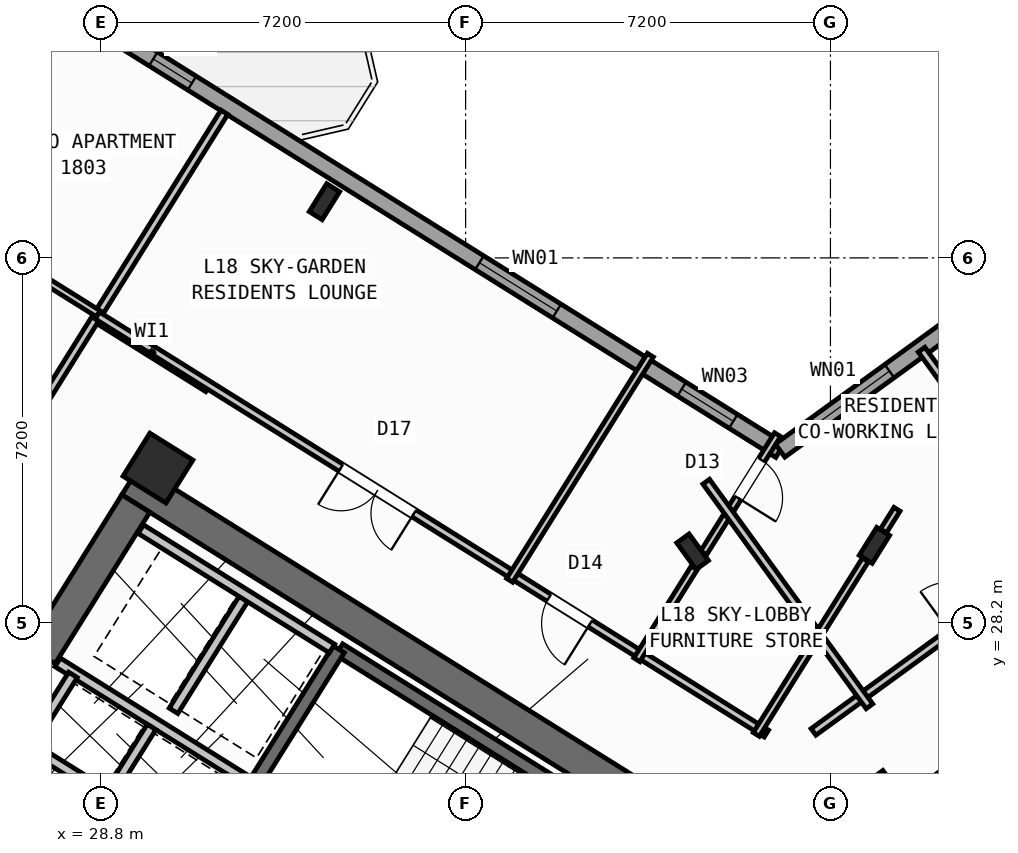
"""IFC4 building model, lengths in metres.
Left out: names, types, materials, properties, quantities, classifications, styles, units other than length and angle.
Written with IfcOpenShell. Run it as: python <this file> out.ifc"""

import sys

from ifc_helpers import new_model, si_unit, direction, frame, frame_2d, origin, origin_2d, place, context, subcontext, project, spatial, rectangle, hollow_rectangle, i_section, extrude, source, transform, mapped, element, fill, save


model = new_model("IFC4")
c1 = context("Model", 3, precision=1e-05, world=origin(), true_north=direction((0.0, 1.0)))
c2 = subcontext(c1, "Body", "Model", "MODEL_VIEW")
j1 = project(units=[si_unit("LENGTHUNIT", "METRE"), si_unit("PLANEANGLEUNIT", "RADIAN")], contexts=[c1])
p1 = place(None, origin())
s1 = spatial("IfcSite", under=j1, at=p1, CompositionType="ELEMENT")
p2 = place(p1, origin())
s2 = spatial("IfcBuilding", under=s1, at=p2, CompositionType="ELEMENT")
p3 = place(p2, frame((0.0, 0.0, 71.7)))
s3 = spatial("IfcBuildingStorey", under=s2, at=p3, CompositionType="ELEMENT", Elevation=71.7)
p4 = place(p3, frame((40.615, 23.983, 0.0), z_axis=(0.0, 0.0, 1.0), x_axis=(-0.848045953968, 0.529922692436, 0.0)))
e1 = element("IfcWall", 1, at=p4, inside=s3, PredefinedType="SHEAR", context=c2, shape_type="SweptSolid", body=[
    extrude(rectangle(XDim=13.24, YDim=0.65, at=frame_2d((6.62, 0.0))), origin(), (0.0, 0.0, 1.0), 4.52),
])
p5 = place(p3, frame((29.491, 30.552, 0.0), z_axis=(0.0, 0.0, 1.0), x_axis=(-0.529893103397, -0.8480644427, 0.0)))
e2 = element("IfcWall", 2, at=p5, inside=s3, PredefinedType="SHEAR", context=c2, shape_type="SweptSolid", body=[
    extrude(rectangle(XDim=3.525, YDim=0.65, at=frame_2d((1.763, 0.0))), origin(), (0.0, 0.0, 1.0), 4.52),
])
p6 = place(p3, frame((44.325, 24.113, 0.0), z_axis=(0.0, 0.0, 1.0), x_axis=(0.809012664862, 0.58779121131, 0.0)))
e3 = element("IfcWall", 3, at=p6, inside=s3, PredefinedType="SHEAR", context=c2, shape_type="SweptSolid", body=[
    extrude(rectangle(XDim=12.44, YDim=0.65, at=frame_2d((6.22, 0.0))), origin(), (0.0, 0.0, 1.0), 4.52),
])
m1 = source(origin(), c2, "Body", "SweptSolid", [
    extrude(i_section(OverallWidth=0.3, OverallDepth=0.65, WebThickness=0.016, FlangeThickness=0.031, at=origin_2d()), origin(), (0.0, 0.0, 1.0), 4.8),
])
for number, where, z_axis, x_axis in (
    (4, (44.068, 29.726, 0.0), (0.0, 0.0, 1.0), (-0.848, 0.53, 0.0)),
    (5, (33.213, 36.509, 0.0), (0.0, 0.0, 1.0), (-0.848, 0.53, 0.0)),
):
    element("IfcColumn", number, at=place(p3, frame(where, z_axis=z_axis, x_axis=x_axis)), inside=s3, PredefinedType="COLUMN", context=c2, shape_type="MappedRepresentation", body=[
        mapped(m1, transform((0.0, 0.0, 0.0), scale=1.0)),
    ])
m2 = source(origin(), c2, "Body", "SweptSolid", [
    extrude(hollow_rectangle(XDim=1.0, YDim=1.0, WallThickness=0.04, at=origin_2d()), origin(), (0.0, 0.0, 1.0), 4.8),
])
for number, where, z_axis, x_axis in (
    (6, (29.928, 31.251, 0.0), (0.0, 0.0, 1.0), (-0.848, 0.53, 0.0)),
    (7, (44.124, 24.585, 0.0), (0.0, 0.0, 1.0), (0.809, 0.588, 0.0)),
):
    element("IfcColumn", number, at=place(p3, frame(where, z_axis=z_axis, x_axis=x_axis)), inside=s3, PredefinedType="COLUMN", context=c2, shape_type="MappedRepresentation", body=[
        mapped(m2, transform((0.0, 0.0, 0.0), scale=1.0)),
    ])
p7 = place(p3, frame((40.479, 29.601, 0.0), z_axis=(0.0, 0.0, 1.0), x_axis=(0.809016994375, 0.587785252292, 0.0)))
e8 = element("IfcColumn", 8, at=p7, inside=s3, PredefinedType="COLUMN", context=c2, shape_type="MappedRepresentation", body=[
    mapped(m1, transform((0.0, 0.0, 0.0), scale=1.0)),
])
p8 = place(p3, frame((31.76, 12.183, 0.0), z_axis=(0.0, 0.0, 1.0), x_axis=(-0.848047074256, 0.529920899612, 0.0)))
e9 = element("IfcWall", 9, at=p8, inside=s3, PredefinedType="STANDARD", context=c2, shape_type="SweptSolid", body=[
    extrude(rectangle(XDim=30.652, YDim=0.32, at=frame_2d((15.326, 0.0))), origin(), (0.0, 0.0, 1.0), 4.52),
])
p9 = place(p8, frame((20.241, 0.0, 0.0)))
e10 = element("IfcOpeningElement", 10, at=p9, cuts=e9, PredefinedType="OPENING", context=c2, shape_type="SweptSolid", body=[
    extrude(rectangle(XDim=1.2, YDim=2.15, at=frame_2d((0.6, 1.075))), frame((0.0, 0.17, 0.0), z_axis=(0.0, -1.0, 0.0), x_axis=(1.0, 0.0, 0.0)), (0.0, 0.0, 1.0), 0.34),
])
p10 = place(p8, frame((14.781, 0.0, 0.0)))
e11 = element("IfcOpeningElement", 11, at=p10, cuts=e9, PredefinedType="OPENING", context=c2, shape_type="SweptSolid", body=[
    extrude(rectangle(XDim=1.5, YDim=2.25, at=frame_2d((0.75, 1.125))), frame((0.0, 0.17, 0.0), z_axis=(0.0, -1.0, 0.0), x_axis=(1.0, 0.0, 0.0)), (0.0, 0.0, 1.0), 0.34),
])
p11 = place(p8, frame((1.84, 0.0, 0.75)))
e12 = element("IfcOpeningElement", 12, at=p11, cuts=e9, PredefinedType="OPENING", context=c2, shape_type="SweptSolid", body=[
    extrude(rectangle(XDim=2.4, YDim=1.6, at=frame_2d((1.2, 0.8))), frame((0.0, 0.17, 0.0), z_axis=(0.0, -1.0, 0.0), x_axis=(1.0, 0.0, 0.0)), (0.0, 0.0, 1.0), 0.34),
])
p12 = place(p8, frame((7.019, 0.0, 0.75)))
e13 = element("IfcOpeningElement", 13, at=p12, cuts=e9, PredefinedType="OPENING", context=c2, shape_type="SweptSolid", body=[
    extrude(rectangle(XDim=2.4, YDim=1.6, at=frame_2d((1.2, 0.8))), frame((0.0, 0.17, 0.0), z_axis=(0.0, -1.0, 0.0), x_axis=(1.0, 0.0, 0.0)), (0.0, 0.0, 1.0), 0.34),
])
p13 = place(p8, frame((25.841, 0.0, 0.95)))
e14 = element("IfcOpeningElement", 14, at=p13, cuts=e9, PredefinedType="OPENING", context=c2, shape_type="SweptSolid", body=[
    extrude(rectangle(XDim=1.2, YDim=1.4, at=frame_2d((0.6, 0.7))), frame((0.0, 0.17, 0.0), z_axis=(0.0, -1.0, 0.0), x_axis=(1.0, 0.0, 0.0)), (0.0, 0.0, 1.0), 0.34),
])
p14 = place(p3, frame((17.424, 47.083, 0.0), z_axis=(0.0, 0.0, 1.0), x_axis=(0.848049927979, -0.529916332693, 0.0)))
e15 = element("IfcWall", 15, at=p14, inside=s3, PredefinedType="STANDARD", context=c2, shape_type="SweptSolid", body=[
    extrude(rectangle(XDim=29.223, YDim=0.32, at=frame_2d((14.612, 0.0))), origin(), (0.0, 0.0, 1.0), 4.52),
])
p15 = place(p14, frame((3.339, 0.0, 0.0)))
e16 = element("IfcOpeningElement", 16, at=p15, cuts=e15, PredefinedType="OPENING", context=c2, shape_type="SweptSolid", body=[
    extrude(rectangle(XDim=1.05, YDim=2.15, at=frame_2d((0.525, 1.075))), frame((0.0, 0.17, 0.0), z_axis=(0.0, -1.0, 0.0), x_axis=(1.0, 0.0, 0.0)), (0.0, 0.0, 1.0), 0.34),
])
p16 = place(p14, frame((8.194, 0.0, 0.75)))
e17 = element("IfcOpeningElement", 17, at=p16, cuts=e15, PredefinedType="OPENING", context=c2, shape_type="SweptSolid", body=[
    extrude(rectangle(XDim=2.4, YDim=1.6, at=frame_2d((1.2, 0.8))), frame((0.0, 0.17, 0.0), z_axis=(0.0, -1.0, 0.0), x_axis=(1.0, 0.0, 0.0)), (0.0, 0.0, 1.0), 0.34),
])
p17 = place(p14, frame((22.226, 0.0, 0.85)))
e18 = element("IfcOpeningElement", 18, at=p17, cuts=e15, PredefinedType="OPENING", context=c2, shape_type="SweptSolid", body=[
    extrude(rectangle(XDim=1.8, YDim=1.5, at=frame_2d((0.9, 0.75))), frame((0.0, 0.17, 0.0), z_axis=(0.0, -1.0, 0.0), x_axis=(1.0, 0.0, 0.0)), (0.0, 0.0, 1.0), 0.34),
])
p18 = place(p14, frame((26.934, 0.0, 0.95)))
e19 = element("IfcOpeningElement", 19, at=p18, cuts=e15, PredefinedType="OPENING", context=c2, shape_type="SweptSolid", body=[
    extrude(rectangle(XDim=1.2, YDim=1.4, at=frame_2d((0.6, 0.7))), frame((0.0, 0.17, 0.0), z_axis=(0.0, -1.0, 0.0), x_axis=(1.0, 0.0, 0.0)), (0.0, 0.0, 1.0), 0.34),
])
p19 = place(p14, frame((14.636, 0.0, 1.0)))
e20 = element("IfcOpeningElement", 20, at=p19, cuts=e15, PredefinedType="OPENING", context=c2, shape_type="SweptSolid", body=[
    extrude(rectangle(XDim=0.9, YDim=1.25, at=frame_2d((0.45, 0.625))), frame((0.0, 0.17, 0.0), z_axis=(0.0, -1.0, 0.0), x_axis=(1.0, 0.0, 0.0)), (0.0, 0.0, 1.0), 0.34),
])
p20 = place(p3, frame((42.207, 31.597, 0.0), z_axis=(0.0, 0.0, 1.0), x_axis=(0.809020333377, 0.587780656523, 0.0)))
e21 = element("IfcWall", 21, at=p20, inside=s3, PredefinedType="STANDARD", context=c2, shape_type="SweptSolid", body=[
    extrude(rectangle(XDim=15.223, YDim=0.32, at=frame_2d((7.611, 0.0))), origin(), (0.0, 0.0, 1.0), 4.52),
])
p21 = place(p20, frame((12.562, 0.0, 0.0)))
e22 = element("IfcOpeningElement", 22, at=p21, cuts=e21, PredefinedType="OPENING", context=c2, shape_type="SweptSolid", body=[
    extrude(rectangle(XDim=1.05, YDim=2.15, at=frame_2d((0.525, 1.075))), frame((0.0, 0.17, 0.0), z_axis=(0.0, -1.0, 0.0), x_axis=(1.0, 0.0, 0.0)), (0.0, 0.0, 1.0), 0.34),
])
p22 = place(p20, frame((0.868, 0.0, 0.85)))
e23 = element("IfcOpeningElement", 23, at=p22, cuts=e21, PredefinedType="OPENING", context=c2, shape_type="SweptSolid", body=[
    extrude(rectangle(XDim=1.8, YDim=1.5, at=frame_2d((0.9, 0.75))), frame((0.0, 0.17, 0.0), z_axis=(0.0, -1.0, 0.0), x_axis=(1.0, 0.0, 0.0)), (0.0, 0.0, 1.0), 0.34),
])
p23 = place(p20, frame((4.932, 0.0, 0.85)))
e24 = element("IfcOpeningElement", 24, at=p23, cuts=e21, PredefinedType="OPENING", context=c2, shape_type="SweptSolid", body=[
    extrude(rectangle(XDim=1.8, YDim=1.5, at=frame_2d((0.9, 0.75))), frame((0.0, 0.17, 0.0), z_axis=(0.0, -1.0, 0.0), x_axis=(1.0, 0.0, 0.0)), (0.0, 0.0, 1.0), 0.34),
])
p24 = place(p3, frame((39.721, 23.788, 0.0), z_axis=(0.0, 0.0, 1.0), x_axis=(-0.848054434086, 0.529909121291, 0.0)))
e25 = element("IfcWall", 25, at=p24, inside=s3, PredefinedType="SHEAR", context=c2, shape_type="SweptSolid", body=[
    extrude(rectangle(XDim=7.33, YDim=0.26, at=frame_2d((3.665, 0.0))), origin(), (0.0, 0.0, 1.0), 4.52),
])
p25 = place(p3, frame((33.496, 27.677, 0.0), z_axis=(0.0, 0.0, 1.0), x_axis=(-0.529908658664, -0.84805472316, 0.0)))
e26 = element("IfcWall", 26, at=p25, inside=s3, PredefinedType="SHEAR", context=c2, shape_type="SweptSolid", body=[
    extrude(rectangle(XDim=3.16, YDim=0.26, at=frame_2d((1.58, 0.0))), origin(), (0.0, 0.0, 1.0), 4.52),
])
p26 = place(p3, frame((31.822, 24.998, 0.0), z_axis=(0.0, 0.0, 1.0), x_axis=(-0.848058348634, 0.529902856485, 0.0)))
e27 = element("IfcWall", 27, at=p26, inside=s3, PredefinedType="STANDARD", context=c2, shape_type="SweptSolid", body=[
    extrude(rectangle(XDim=4.568, YDim=0.2, at=frame_2d((2.284, 0.0))), origin(), (0.0, 0.0, 1.0), 4.51),
])
p27 = place(p3, frame((32.108, 22.814, 0.0), z_axis=(0.0, 0.0, 1.0), x_axis=(-0.848042229521, 0.529928652696, 0.0)))
e28 = element("IfcWall", 28, at=p27, inside=s3, PredefinedType="STANDARD", context=c2, shape_type="SweptSolid", body=[
    extrude(rectangle(XDim=5.62, YDim=0.2, at=frame_2d((2.81, 0.0))), origin(), (0.0, 0.0, 1.0), 4.51),
])
p28 = place(p3, frame((28.25, 27.17, 0.0), z_axis=(0.0, 0.0, 1.0), x_axis=(-0.529905827651, -0.848056492117, 0.0)))
e29 = element("IfcWall", 29, at=p28, inside=s3, PredefinedType="STANDARD", context=c2, shape_type="SweptSolid", body=[
    extrude(rectangle(XDim=1.65, YDim=0.2, at=frame_2d((0.825, 0.0))), origin(), (0.0, 0.0, 1.0), 4.51),
])
p29 = place(p3, frame((31.645, 28.716, 0.0), z_axis=(0.0, 0.0, 1.0), x_axis=(-0.52986693015, -0.848080795876, 0.0)))
e30 = element("IfcWall", 30, at=p29, inside=s3, PredefinedType="STANDARD", context=c2, shape_type="SweptSolid", body=[
    extrude(rectangle(XDim=2.66, YDim=0.2, at=frame_2d((1.33, 0.0))), origin(), (0.0, 0.0, 1.0), 4.51),
])
p30 = place(p3, frame((33.363, 27.69, 0.0), z_axis=(0.0, 0.0, 1.0), x_axis=(-0.848053806312, 0.529910125964, 0.0)))
e31 = element("IfcWall", 31, at=p30, inside=s3, PredefinedType="STANDARD", context=c2, shape_type="SweptSolid", body=[
    extrude(rectangle(XDim=4.448, YDim=0.2, at=frame_2d((2.224, 0.0))), origin(), (0.0, 0.0, 1.0), 4.51),
])
p31 = place(p3, frame((29.801, 26.142, 0.0), z_axis=(0.0, 0.0, 1.0), x_axis=(-0.529998940003, -0.847998304005, 0.0)))
e32 = element("IfcWall", 32, at=p31, inside=s3, PredefinedType="STANDARD", context=c2, shape_type="SweptSolid", body=[
    extrude(rectangle(XDim=1.58, YDim=0.2, at=frame_2d((0.79, 0.0))), origin(), (0.0, 0.0, 1.0), 4.51),
])
p32 = place(p3, frame((30.914, 32.829, 0.0), z_axis=(0.0, 0.0, 1.0), x_axis=(-0.848008813643, 0.529982124211, 0.0)))
e33 = element("IfcWall", 33, at=p32, inside=s3, PredefinedType="PARTITIONING", context=c2, shape_type="SweptSolid", body=[
    extrude(rectangle(XDim=2.61, YDim=0.16, at=frame_2d((1.305, 0.0))), origin(), (0.0, 0.0, 1.0), 4.51),
])
p33 = place(p3, frame((31.239, 38.274, 0.0), z_axis=(0.0, 0.0, 1.0), x_axis=(-0.529920220799, -0.848047498427, 0.0)))
e34 = element("IfcWall", 34, at=p33, inside=s3, PredefinedType="PARTITIONING", context=c2, shape_type="SweptSolid", body=[
    extrude(rectangle(XDim=9.2, YDim=0.16, at=frame_2d((4.6, 0.0))), origin(), (0.0, 0.0, 1.0), 4.51),
])
p34 = place(p3, frame((28.753, 34.297, 0.0), z_axis=(0.0, 0.0, 1.0), x_axis=(-0.848059820872, 0.529900500304, 0.0)))
e35 = element("IfcWall", 35, at=p34, inside=s3, PredefinedType="PLUMBINGWALL", context=c2, shape_type="SweptSolid", body=[
    extrude(rectangle(XDim=3.79, YDim=0.14, at=frame_2d((1.895, 0.0))), origin(), (0.0, 0.0, 1.0), 4.51),
])
p35 = place(p34, frame((1.87, 0.0, 0.0)))
e36 = element("IfcOpeningElement", 36, at=p35, cuts=e35, PredefinedType="OPENING", context=c2, shape_type="SweptSolid", body=[
    extrude(rectangle(XDim=0.78, YDim=2.05, at=frame_2d((0.39, 1.025))), frame((0.0, 0.08, 0.0), z_axis=(0.0, -1.0, 0.0), x_axis=(1.0, 0.0, 0.0)), (0.0, 0.0, 1.0), 0.16),
])
p36 = place(p3, frame((41.936, 26.012, 0.0), z_axis=(0.0, 0.0, 1.0), x_axis=(-0.848051154596, 0.529914369676, 0.0)))
e37 = element("IfcWall", 37, at=p36, inside=s3, PredefinedType="PARTITIONING", context=c2, shape_type="SweptSolid", body=[
    extrude(rectangle(XDim=15.57, YDim=0.16, at=frame_2d((7.785, 0.0))), origin(), (0.0, 0.0, 1.0), 4.51),
])
p37 = place(p36, frame((4.1, 0.0, 0.0)))
e38 = element("IfcOpeningElement", 38, at=p37, cuts=e37, PredefinedType="OPENING", context=c2, shape_type="SweptSolid", body=[
    extrude(rectangle(XDim=0.96, YDim=2.08, at=frame_2d((0.48, 1.04))), frame((0.0, 0.09, 0.0), z_axis=(0.0, -1.0, 0.0), x_axis=(1.0, 0.0, 0.0)), (0.0, 0.0, 1.0), 0.18),
])
p38 = place(p36, frame((8.2, 0.0, 0.0)))
e39 = element("IfcOpeningElement", 39, at=p38, cuts=e37, PredefinedType="OPENING", context=c2, shape_type="SweptSolid", body=[
    extrude(rectangle(XDim=1.7, YDim=2.2, at=frame_2d((0.85, 1.1))), frame((0.0, 0.09, 0.0), z_axis=(0.0, -1.0, 0.0), x_axis=(1.0, 0.0, 0.0)), (0.0, 0.0, 1.0), 0.18),
])
p39 = place(p3, frame((42.156, 31.912, 0.0), z_axis=(0.0, 0.0, 1.0), x_axis=(-0.529943141103, -0.848033175765, 0.0)))
e40 = element("IfcWall", 40, at=p39, inside=s3, PredefinedType="PLUMBINGWALL", context=c2, shape_type="SweptSolid", body=[
    extrude(rectangle(XDim=2.753, YDim=0.14, at=frame_2d((1.376, 0.0))), origin(), (0.0, 0.0, 1.0), 4.005),
])
p40 = place(p39, frame((0.593, 0.0, 0.0)))
e41 = element("IfcOpeningElement", 41, at=p40, cuts=e40, PredefinedType="OPENING", context=c2, shape_type="SweptSolid", body=[
    extrude(rectangle(XDim=0.88, YDim=2.08, at=frame_2d((0.44, 1.04))), frame((0.0, 0.08, 0.0), z_axis=(0.0, -1.0, 0.0), x_axis=(1.0, 0.0, 0.0)), (0.0, 0.0, 1.0), 0.16),
])
p41 = place(p3, frame((40.512, 29.281, 0.0), z_axis=(0.0, 0.0, 1.0), x_axis=(-0.529947607416, -0.848030384712, 0.0)))
e42 = element("IfcWall", 42, at=p41, inside=s3, PredefinedType="PLUMBINGWALL", context=c2, shape_type="SweptSolid", body=[
    extrude(rectangle(XDim=2.138, YDim=0.14, at=frame_2d((1.069, 0.0))), origin(), (0.0, 0.0, 1.0), 4.51),
])
p42 = place(p3, frame((44.514, 30.439, 0.0), z_axis=(0.0, 0.0, 1.0), x_axis=(-0.529824479439, -0.848107316905, 0.0)))
e43 = element("IfcWall", 43, at=p42, inside=s3, PredefinedType="PLUMBINGWALL", context=c2, shape_type="SweptSolid", body=[
    extrude(rectangle(XDim=0.503, YDim=0.14, at=frame_2d((0.251, 0.0))), origin(), (0.0, 0.0, 1.0), 4.51),
])
p43 = place(p3, frame((43.89, 29.44, 0.0), z_axis=(0.0, 0.0, 1.0), x_axis=(-0.529928721319, -0.84804218664, 0.0)))
e44 = element("IfcWall", 44, at=p43, inside=s3, PredefinedType="PLUMBINGWALL", context=c2, shape_type="SweptSolid", body=[
    extrude(rectangle(XDim=4.063, YDim=0.14, at=frame_2d((2.031, 0.0))), origin(), (0.0, 0.0, 1.0), 3.895),
])
p44 = place(p3, frame((39.646, 33.48, 0.0), z_axis=(0.0, 0.0, 1.0), x_axis=(-0.529923555071, -0.848045414928, 0.0)))
e45 = element("IfcWall", 45, at=p44, inside=s3, PredefinedType="PLUMBINGWALL", context=c2, shape_type="SweptSolid", body=[
    extrude(rectangle(XDim=5.24, YDim=0.14, at=frame_2d((2.62, 0.0))), origin(), (0.0, 0.0, 1.0), 4.51),
])
p45 = place(p3, frame((42.866, 26.044, 0.0), z_axis=(0.0, 0.0, 1.0), x_axis=(0.809020254154, 0.587780765566, 0.0)))
e46 = element("IfcWall", 46, at=p45, inside=s3, PredefinedType="PARTITIONING", context=c2, shape_type="SweptSolid", body=[
    extrude(rectangle(XDim=14.67, YDim=0.16, at=frame_2d((7.335, 0.0))), origin(), (0.0, 0.0, 1.0), 4.51),
])
p46 = place(p45, frame((3.335, 0.0, 0.0)))
e47 = element("IfcOpeningElement", 47, at=p46, cuts=e46, PredefinedType="OPENING", context=c2, shape_type="SweptSolid", body=[
    extrude(rectangle(XDim=1.0, YDim=2.1, at=frame_2d((0.5, 1.05))), frame((0.0, 0.09, 0.0), z_axis=(0.0, -1.0, 0.0), x_axis=(1.0, 0.0, 0.0)), (0.0, 0.0, 1.0), 0.18),
])
p47 = place(p45, frame((9.915, 0.0, 0.0)))
e48 = element("IfcOpeningElement", 48, at=p47, cuts=e46, PredefinedType="OPENING", context=c2, shape_type="SweptSolid", body=[
    extrude(rectangle(XDim=1.0, YDim=2.1, at=frame_2d((0.5, 1.05))), frame((0.0, 0.09, 0.0), z_axis=(0.0, -1.0, 0.0), x_axis=(1.0, 0.0, 0.0)), (0.0, 0.0, 1.0), 0.18),
])
p48 = place(p3, frame((43.969, 26.55, 0.0), z_axis=(0.0, 0.0, 1.0), x_axis=(-0.587776919386, 0.80902304852, 0.0)))
e49 = element("IfcWall", 49, at=p48, inside=s3, PredefinedType="PARTITIONING", context=c2, shape_type="SweptSolid", body=[
    extrude(rectangle(XDim=5.48, YDim=0.16, at=frame_2d((2.74, 0.0))), origin(), (0.0, 0.0, 1.0), 4.51),
])
p49 = place(p3, frame((47.849, 29.665, 0.0), z_axis=(0.0, 0.0, 1.0), x_axis=(-0.587785532001, 0.809016791155, 0.0)))
e50 = element("IfcWall", 50, at=p49, inside=s3, PredefinedType="PARTITIONING", context=c2, shape_type="SweptSolid", body=[
    extrude(rectangle(XDim=4.85, YDim=0.16, at=frame_2d((2.425, 0.0))), origin(), (0.0, 0.0, 1.0), 4.51),
])
m3 = source(origin(), c2, "Body", "SweptSolid", [
    extrude(rectangle(XDim=1.8, YDim=1.5, at=frame_2d((0.9, 0.75))), frame((0.0, 0.03, 0.0), z_axis=(0.0, -1.0, 0.0), x_axis=(1.0, 0.0, 0.0)), (0.0, 0.0, 1.0), 0.06),
])
p50 = place(p17, origin())
e51 = element("IfcWindow", 51, at=p50, inside=s3, PartitioningType="SINGLE_PANEL", PredefinedType="WINDOW", context=c2, shape_type="MappedRepresentation", body=[
    mapped(m3, transform((0.0, 0.0, 0.0), scale=1.0)),
])
fill(e18, e51)
m4 = source(origin(), c2, "Body", "SweptSolid", [
    extrude(rectangle(XDim=1.2, YDim=1.4, at=frame_2d((0.6, 0.7))), frame((0.0, 0.03, 0.0), z_axis=(0.0, -1.0, 0.0), x_axis=(1.0, 0.0, 0.0)), (0.0, 0.0, 1.0), 0.06),
])
p51 = place(p18, origin())
e52 = element("IfcWindow", 52, at=p51, inside=s3, PartitioningType="SINGLE_PANEL", PredefinedType="WINDOW", context=c2, shape_type="MappedRepresentation", body=[
    mapped(m4, transform((0.0, 0.0, 0.0), scale=1.0)),
])
fill(e19, e52)
p52 = place(p22, origin())
e53 = element("IfcWindow", 53, at=p52, inside=s3, PartitioningType="SINGLE_PANEL", PredefinedType="WINDOW", context=c2, shape_type="MappedRepresentation", body=[
    mapped(m3, transform((0.0, 0.0, 0.0), scale=1.0)),
])
fill(e23, e53)
m5 = source(origin(), c2, "Body", "SweptSolid", [
    extrude(rectangle(XDim=0.9, YDim=1.25, at=frame_2d((0.45, 0.625))), frame((0.0, 0.03, 0.0), z_axis=(0.0, -1.0, 0.0), x_axis=(1.0, 0.0, 0.0)), (0.0, 0.0, 1.0), 0.06),
])
p53 = place(p19, origin())
e54 = element("IfcWindow", 54, at=p53, inside=s3, PartitioningType="SINGLE_PANEL", PredefinedType="WINDOW", context=c2, shape_type="MappedRepresentation", body=[
    mapped(m5, transform((0.0, 0.0, 0.0), scale=1.0)),
])
fill(e20, e54)
m6 = source(origin(), c2, "Body", "SweptSolid", [
    extrude(rectangle(XDim=0.88, YDim=2.08, at=frame_2d((0.44, 1.04))), frame((0.0, 0.025, 0.0), z_axis=(0.0, -1.0, 0.0), x_axis=(1.0, 0.0, 0.0)), (0.0, 0.0, 1.0), 0.05),
])
p54 = place(p40, origin())
e55 = element("IfcDoor", 55, at=p54, inside=s3, OperationType="SINGLE_SWING_RIGHT", PredefinedType="DOOR", context=c2, shape_type="MappedRepresentation", body=[
    mapped(m6, transform((0.0, 0.0, 0.0), scale=1.0)),
])
fill(e41, e55)
m7 = source(origin(), c2, "Body", "SweptSolid", [
    extrude(rectangle(XDim=0.96, YDim=2.08, at=frame_2d((0.48, 1.04))), frame((0.0, 0.025, 0.0), z_axis=(0.0, -1.0, 0.0), x_axis=(1.0, 0.0, 0.0)), (0.0, 0.0, 1.0), 0.05),
])
p55 = place(p37, origin())
e56 = element("IfcDoor", 56, at=p55, inside=s3, OperationType="SINGLE_SWING_LEFT", PredefinedType="DOOR", context=c2, shape_type="MappedRepresentation", body=[
    mapped(m7, transform((0.0, 0.0, 0.0), scale=1.0)),
])
fill(e38, e56)
m8 = source(origin(), c2, "Body", "SweptSolid", [
    extrude(rectangle(XDim=1.7, YDim=2.2, at=frame_2d((0.85, 1.1))), frame((0.0, 0.025, 0.0), z_axis=(0.0, -1.0, 0.0), x_axis=(1.0, 0.0, 0.0)), (0.0, 0.0, 1.0), 0.05),
])
p56 = place(p38, origin())
e57 = element("IfcDoor", 57, at=p56, inside=s3, OperationType="DOUBLE_DOOR_SINGLE_SWING", PredefinedType="DOOR", context=c2, shape_type="MappedRepresentation", body=[
    mapped(m8, transform((0.0, 0.0, 0.0), scale=1.0)),
])
fill(e39, e57)
save(model, sys.argv[1])
